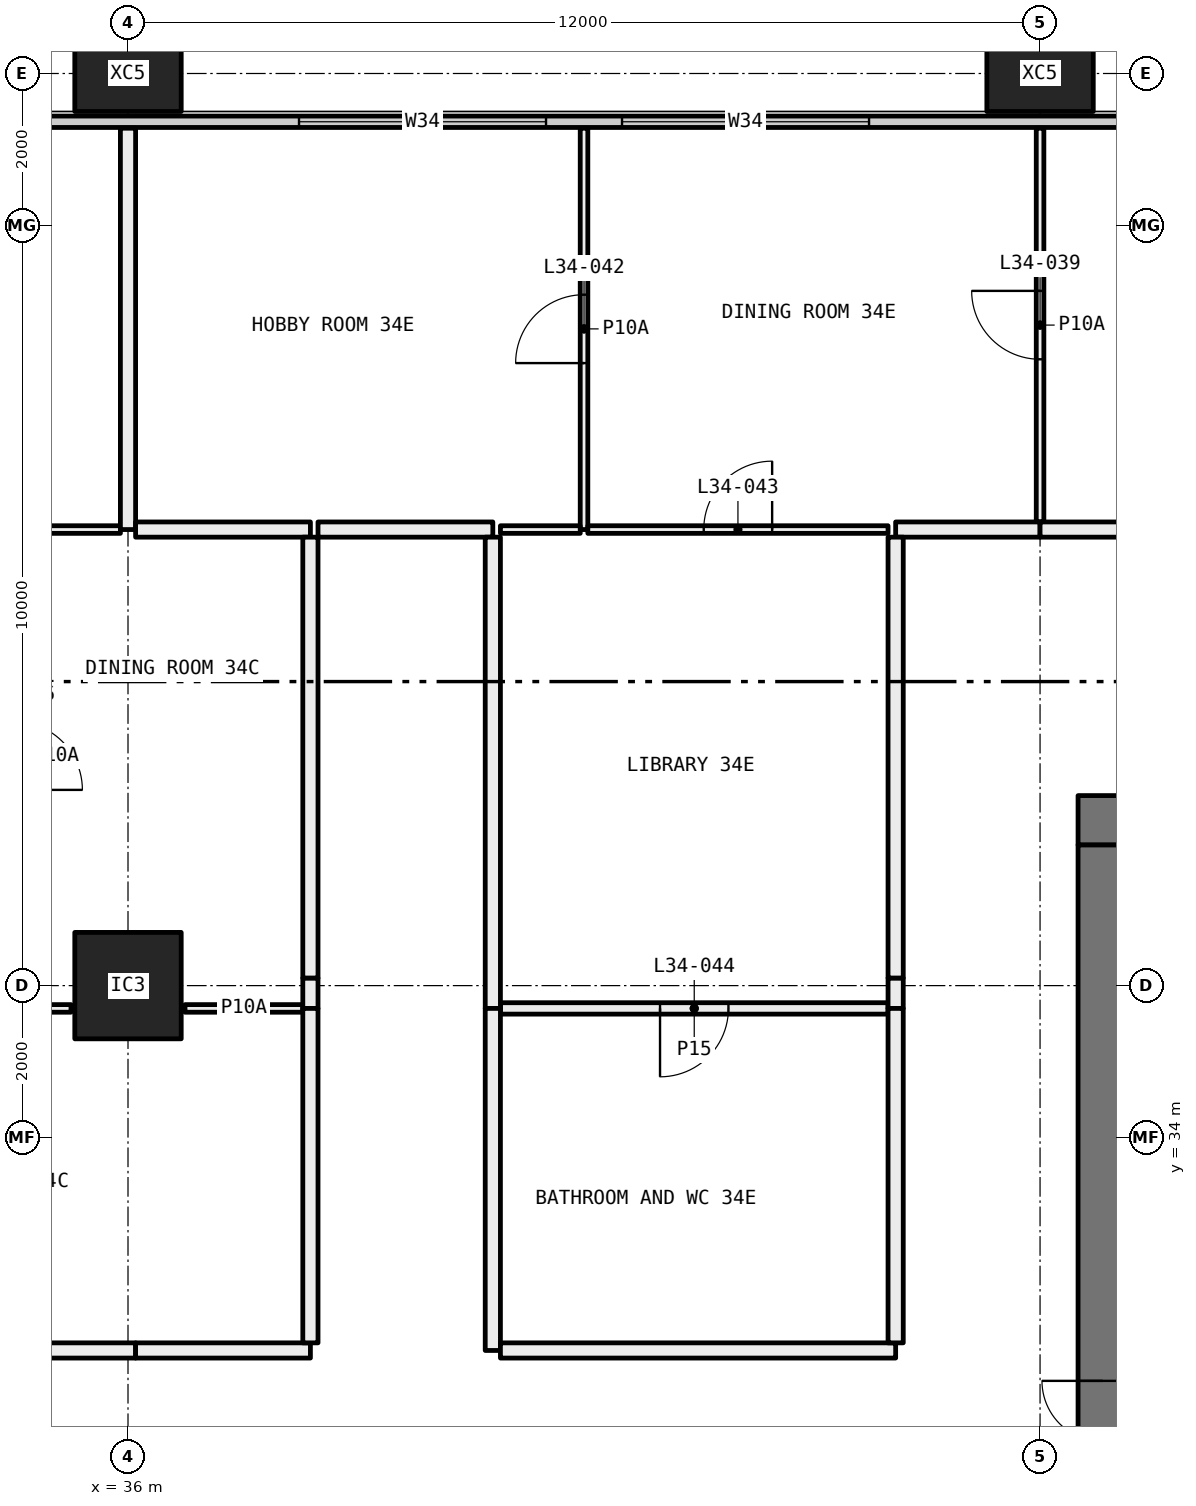
"""IFC4 building model, lengths in metres.
Left out: names, types, materials, properties, quantities, classifications, styles, units other than length and angle.
Written with IfcOpenShell. Run it as: python <this file> out.ifc"""

import sys

from ifc_helpers import new_model, si_unit, direction, frame, frame_2d, origin, origin_2d, place, context, subcontext, project, spatial, rectangle, hollow_rectangle, extrude, element, fill, save


model = new_model("IFC4")
c1 = context("Model", 3, precision=1e-05, world=origin(), true_north=direction((0.0, 1.0)))
c2 = subcontext(c1, "Body", "Model", "MODEL_VIEW")
j1 = project(units=[si_unit("LENGTHUNIT", "METRE"), si_unit("PLANEANGLEUNIT", "RADIAN")], contexts=[c1])
p1 = place(None, origin())
s1 = spatial("IfcSite", under=j1, at=p1, CompositionType="ELEMENT")
p2 = place(p1, origin())
s2 = spatial("IfcBuilding", under=s1, at=p2, CompositionType="ELEMENT")
p3 = place(p2, frame((0.0, 0.0, 131.1)))
s3 = spatial("IfcBuildingStorey", under=s2, at=p3, CompositionType="ELEMENT", Elevation=131.1)
p4 = place(p3, frame((36.0, 36.0, 0.0), z_axis=(0.0, 0.0, 1.0), x_axis=(1.0, 0.0, 0.0)))
e1 = element("IfcColumn", 1, at=p4, inside=s3, PredefinedType="COLUMN", context=c2, shape_type="SweptSolid", body=[
    extrude(hollow_rectangle(XDim=1.4, YDim=1.4, WallThickness=0.06, at=origin_2d()), origin(), (0.0, 0.0, 1.0), 3.05),
])
for number, where, z_axis, x_axis in (
    (2, (36.0, 48.0, -0.4), (0.0, 0.0, 1.0), (1.0, 0.0, 0.0)),
    (3, (48.0, 48.0, -0.4), (0.0, 0.0, 1.0), (1.0, 0.0, 0.0)),
):
    element("IfcColumn", number, at=place(p3, frame(where, z_axis=z_axis, x_axis=x_axis)), inside=s3, PredefinedType="COLUMN", context=c2, shape_type="SweptSolid", body=[
        extrude(hollow_rectangle(XDim=1.4, YDim=1.0, WallThickness=0.055, at=origin_2d()), origin(), (0.0, 0.0, 1.0), 3.45),
    ])
p5 = place(p3, frame((6.56, 47.365, 0.0), z_axis=(0.0, 0.0, 1.0), x_axis=(1.0, 0.0, 0.0)))
e4 = element("IfcWall", 4, at=p5, inside=s3, PredefinedType="ELEMENTEDWALL", context=c2, shape_type="SweptSolid", body=[
    extrude(rectangle(XDim=58.88, YDim=0.15, at=frame_2d((29.44, 0.0))), origin(), (0.0, 0.0, 1.0), 3.05),
])
p6 = place(p5, frame((0.44, 0.0, 0.45)))
e5 = element("IfcOpeningElement", 5, at=p6, cuts=e4, PredefinedType="OPENING", context=c2, shape_type="SweptSolid", body=[
    extrude(rectangle(XDim=4.5, YDim=2.55, at=frame_2d((2.25, 1.275))), frame((0.0, 0.085, 0.0), z_axis=(0.0, -1.0, 0.0), x_axis=(1.0, 0.0, 0.0)), (0.0, 0.0, 1.0), 0.17),
])
p7 = place(p5, frame((7.69, 0.0, 0.45)))
e6 = element("IfcOpeningElement", 6, at=p7, cuts=e4, PredefinedType="OPENING", context=c2, shape_type="SweptSolid", body=[
    extrude(rectangle(XDim=3.25, YDim=2.55, at=frame_2d((1.625, 1.275))), frame((0.0, 0.085, 0.0), z_axis=(0.0, -1.0, 0.0), x_axis=(1.0, 0.0, 0.0)), (0.0, 0.0, 1.0), 0.17),
])
p8 = place(p5, frame((11.94, 0.0, 0.45)))
e7 = element("IfcOpeningElement", 7, at=p8, cuts=e4, PredefinedType="OPENING", context=c2, shape_type="SweptSolid", body=[
    extrude(rectangle(XDim=3.25, YDim=2.55, at=frame_2d((1.625, 1.275))), frame((0.0, 0.085, 0.0), z_axis=(0.0, -1.0, 0.0), x_axis=(1.0, 0.0, 0.0)), (0.0, 0.0, 1.0), 0.17),
])
p9 = place(p5, frame((19.69, 0.0, 0.45)))
e8 = element("IfcOpeningElement", 8, at=p9, cuts=e4, PredefinedType="OPENING", context=c2, shape_type="SweptSolid", body=[
    extrude(rectangle(XDim=3.25, YDim=2.55, at=frame_2d((1.625, 1.275))), frame((0.0, 0.085, 0.0), z_axis=(0.0, -1.0, 0.0), x_axis=(1.0, 0.0, 0.0)), (0.0, 0.0, 1.0), 0.17),
])
p10 = place(p5, frame((23.94, 0.0, 0.45)))
e9 = element("IfcOpeningElement", 9, at=p10, cuts=e4, PredefinedType="OPENING", context=c2, shape_type="SweptSolid", body=[
    extrude(rectangle(XDim=2.0, YDim=2.55, at=frame_2d((1.0, 1.275))), frame((0.0, 0.085, 0.0), z_axis=(0.0, -1.0, 0.0), x_axis=(1.0, 0.0, 0.0)), (0.0, 0.0, 1.0), 0.17),
])
p11 = place(p5, frame((31.69, 0.0, 0.45)))
e10 = element("IfcOpeningElement", 10, at=p11, cuts=e4, PredefinedType="OPENING", context=c2, shape_type="SweptSolid", body=[
    extrude(rectangle(XDim=3.25, YDim=2.55, at=frame_2d((1.625, 1.275))), frame((0.0, 0.085, 0.0), z_axis=(0.0, -1.0, 0.0), x_axis=(1.0, 0.0, 0.0)), (0.0, 0.0, 1.0), 0.17),
])
p12 = place(p5, frame((35.94, 0.0, 0.45)))
e11 = element("IfcOpeningElement", 11, at=p12, cuts=e4, PredefinedType="OPENING", context=c2, shape_type="SweptSolid", body=[
    extrude(rectangle(XDim=3.25, YDim=2.55, at=frame_2d((1.625, 1.275))), frame((0.0, 0.085, 0.0), z_axis=(0.0, -1.0, 0.0), x_axis=(1.0, 0.0, 0.0)), (0.0, 0.0, 1.0), 0.17),
])
p13 = place(p5, frame((43.69, 0.0, 0.45)))
e12 = element("IfcOpeningElement", 12, at=p13, cuts=e4, PredefinedType="OPENING", context=c2, shape_type="SweptSolid", body=[
    extrude(rectangle(XDim=3.25, YDim=2.55, at=frame_2d((1.625, 1.275))), frame((0.0, 0.085, 0.0), z_axis=(0.0, -1.0, 0.0), x_axis=(1.0, 0.0, 0.0)), (0.0, 0.0, 1.0), 0.17),
])
p14 = place(p5, frame((47.94, 0.0, 0.45)))
e13 = element("IfcOpeningElement", 13, at=p14, cuts=e4, PredefinedType="OPENING", context=c2, shape_type="SweptSolid", body=[
    extrude(rectangle(XDim=2.0, YDim=2.55, at=frame_2d((1.0, 1.275))), frame((0.0, 0.085, 0.0), z_axis=(0.0, -1.0, 0.0), x_axis=(1.0, 0.0, 0.0)), (0.0, 0.0, 1.0), 0.17),
])
p15 = place(p5, frame((53.94, 0.0, 0.45)))
e14 = element("IfcOpeningElement", 14, at=p15, cuts=e4, PredefinedType="OPENING", context=c2, shape_type="SweptSolid", body=[
    extrude(rectangle(XDim=4.5, YDim=2.55, at=frame_2d((2.25, 1.275))), frame((0.0, 0.085, 0.0), z_axis=(0.0, -1.0, 0.0), x_axis=(1.0, 0.0, 0.0)), (0.0, 0.0, 1.0), 0.17),
])
p16 = place(p3, frame((34.5, 42.0, 0.0), z_axis=(0.0, 0.0, 1.0), x_axis=(1.0, 0.0, 0.0)))
e15 = element("IfcWall", 15, at=p16, inside=s3, PredefinedType="PARTITIONING", context=c2, shape_type="SweptSolid", body=[
    extrude(rectangle(XDim=1.4, YDim=0.1, at=frame_2d((0.7, 0.0))), origin(), (0.0, 0.0, 1.0), 3.05),
])
p17 = place(p3, frame((36.0, 42.0, 0.0), z_axis=(0.0, 0.0, 1.0), x_axis=(0.0, 1.0, 0.0)))
e16 = element("IfcWall", 16, at=p17, inside=s3, PredefinedType="PARTITIONING", context=c2, shape_type="SweptSolid", body=[
    extrude(rectangle(XDim=5.28, YDim=0.2, at=frame_2d((2.64, 0.0))), origin(), (0.0, 0.0, 1.0), 2.45),
])
p18 = place(p3, frame((34.55, 35.7, 0.0), z_axis=(0.0, 0.0, 1.0), x_axis=(1.0, 0.0, 0.0)))
e17 = element("IfcWall", 17, at=p18, inside=s3, PredefinedType="PARTITIONING", context=c2, shape_type="SweptSolid", body=[
    extrude(rectangle(XDim=0.7, YDim=0.1, at=frame_2d((0.35, 0.0))), origin(), (0.0, 0.0, 1.0), 3.05),
])
p19 = place(p3, frame((36.75, 35.7, 0.0), z_axis=(0.0, 0.0, 1.0), x_axis=(1.0, 0.0, 0.0)))
e18 = element("IfcWall", 18, at=p19, inside=s3, PredefinedType="PARTITIONING", context=c2, shape_type="SweptSolid", body=[
    extrude(rectangle(XDim=1.55, YDim=0.1, at=frame_2d((0.775, 0.0))), origin(), (0.0, 0.0, 1.0), 3.05),
])
p20 = place(p3, frame((38.4, 42.0, 0.0), z_axis=(0.0, 0.0, 1.0), x_axis=(-1.0, 0.0, 0.0)))
e19 = element("IfcWall", 19, at=p20, inside=s3, PredefinedType="PARTITIONING", context=c2, shape_type="SweptSolid", body=[
    extrude(rectangle(XDim=2.3, YDim=0.2, at=frame_2d((1.15, 0.0))), origin(), (0.0, 0.0, 1.0), 3.05),
])
p21 = place(p3, frame((38.4, 35.7, 0.0), z_axis=(0.0, 0.0, 1.0), x_axis=(0.0, 1.0, 0.0)))
e20 = element("IfcWall", 20, at=p21, inside=s3, PredefinedType="PARTITIONING", context=c2, shape_type="SweptSolid", body=[
    extrude(rectangle(XDim=0.4, YDim=0.2, at=frame_2d((0.2, 0.0))), origin(), (0.0, 0.0, 1.0), 2.45),
])
p22 = place(p3, frame((38.4, 36.1, 0.0), z_axis=(0.0, 0.0, 1.0), x_axis=(0.0, 1.0, 0.0)))
e21 = element("IfcWall", 21, at=p22, inside=s3, PredefinedType="PARTITIONING", context=c2, shape_type="SweptSolid", body=[
    extrude(rectangle(XDim=5.8, YDim=0.2, at=frame_2d((2.9, 0.0))), origin(), (0.0, 0.0, 1.0), 3.05),
])
p23 = place(p3, frame((28.5, 31.2, 0.0), z_axis=(0.0, 0.0, 1.0), x_axis=(1.0, 0.0, 0.0)))
e22 = element("IfcWall", 22, at=p23, inside=s3, PredefinedType="PARTITIONING", context=c2, shape_type="SweptSolid", body=[
    extrude(rectangle(XDim=7.6, YDim=0.2, at=frame_2d((3.8, 0.0))), origin(), (0.0, 0.0, 1.0), 2.45),
])
p24 = place(p3, frame((36.1, 31.2, 0.0), z_axis=(0.0, 0.0, 1.0), x_axis=(1.0, 0.0, 0.0)))
e23 = element("IfcWall", 23, at=p24, inside=s3, PredefinedType="PARTITIONING", context=c2, shape_type="SweptSolid", body=[
    extrude(rectangle(XDim=2.3, YDim=0.2, at=frame_2d((1.15, 0.0))), origin(), (0.0, 0.0, 1.0), 3.05),
])
p25 = place(p3, frame((38.4, 31.3, 0.0), z_axis=(0.0, 0.0, 1.0), x_axis=(0.0, 1.0, 0.0)))
e24 = element("IfcWall", 24, at=p25, inside=s3, PredefinedType="PARTITIONING", context=c2, shape_type="SweptSolid", body=[
    extrude(rectangle(XDim=4.4, YDim=0.2, at=frame_2d((2.2, 0.0))), origin(), (0.0, 0.0, 1.0), 3.05),
])
p26 = place(p3, frame((42.0, 42.0, 0.0), z_axis=(0.0, 0.0, 1.0), x_axis=(0.0, 1.0, 0.0)))
e25 = element("IfcWall", 25, at=p26, inside=s3, PredefinedType="PARTITIONING", context=c2, shape_type="SweptSolid", body=[
    extrude(rectangle(XDim=5.28, YDim=0.1, at=frame_2d((2.64, 0.0))), origin(), (0.0, 0.0, 1.0), 3.05),
])
p27 = place(p26, frame((2.19, 0.0, 0.0)))
e26 = element("IfcOpeningElement", 26, at=p27, cuts=e25, PredefinedType="OPENING", context=c2, shape_type="SweptSolid", body=[
    extrude(rectangle(XDim=0.9, YDim=2.1, at=frame_2d((0.45, 1.05))), frame((0.0, 0.06, 0.0), z_axis=(0.0, -1.0, 0.0), x_axis=(1.0, 0.0, 0.0)), (0.0, 0.0, 1.0), 0.12),
])
p28 = place(p3, frame((40.9, 42.0, 0.0), z_axis=(0.0, 0.0, 1.0), x_axis=(1.0, 0.0, 0.0)))
e27 = element("IfcWall", 27, at=p28, inside=s3, PredefinedType="PARTITIONING", context=c2, shape_type="SweptSolid", body=[
    extrude(rectangle(XDim=1.05, YDim=0.1, at=frame_2d((0.525, 0.0))), origin(), (0.0, 0.0, 1.0), 3.05),
])
p29 = place(p3, frame((38.5, 42.0, 0.0), z_axis=(0.0, 0.0, 1.0), x_axis=(1.0, 0.0, 0.0)))
e28 = element("IfcWall", 28, at=p29, inside=s3, PredefinedType="PARTITIONING", context=c2, shape_type="SweptSolid", body=[
    extrude(rectangle(XDim=2.3, YDim=0.2, at=frame_2d((1.15, 0.0))), origin(), (0.0, 0.0, 1.0), 3.05),
])
p30 = place(p3, frame((48.0, 42.1, 0.0), z_axis=(0.0, 0.0, 1.0), x_axis=(0.0, 1.0, 0.0)))
e29 = element("IfcWall", 29, at=p30, inside=s3, PredefinedType="PARTITIONING", context=c2, shape_type="SweptSolid", body=[
    extrude(rectangle(XDim=5.18, YDim=0.1, at=frame_2d((2.59, 0.0))), origin(), (0.0, 0.0, 1.0), 3.05),
])
p31 = place(p30, frame((2.14, 0.0, 0.0)))
e30 = element("IfcOpeningElement", 30, at=p31, cuts=e29, PredefinedType="OPENING", context=c2, shape_type="SweptSolid", body=[
    extrude(rectangle(XDim=0.9, YDim=2.1, at=frame_2d((0.45, 1.05))), frame((0.0, 0.06, 0.0), z_axis=(0.0, -1.0, 0.0), x_axis=(1.0, 0.0, 0.0)), (0.0, 0.0, 1.0), 0.12),
])
p32 = place(p3, frame((42.05, 42.0, 0.0), z_axis=(0.0, 0.0, 1.0), x_axis=(1.0, 0.0, 0.0)))
e31 = element("IfcWall", 31, at=p32, inside=s3, PredefinedType="PARTITIONING", context=c2, shape_type="SweptSolid", body=[
    extrude(rectangle(XDim=3.95, YDim=0.1, at=frame_2d((1.975, 0.0))), origin(), (0.0, 0.0, 1.0), 3.05),
])
p33 = place(p32, frame((1.525, 0.0, 0.0)))
e32 = element("IfcOpeningElement", 32, at=p33, cuts=e31, PredefinedType="OPENING", context=c2, shape_type="SweptSolid", body=[
    extrude(rectangle(XDim=0.9, YDim=2.1, at=frame_2d((0.45, 1.05))), frame((0.0, 0.06, 0.0), z_axis=(0.0, -1.0, 0.0), x_axis=(1.0, 0.0, 0.0)), (0.0, 0.0, 1.0), 0.12),
])
p34 = place(p3, frame((46.1, 42.0, 0.0), z_axis=(0.0, 0.0, 1.0), x_axis=(1.0, 0.0, 0.0)))
e33 = element("IfcWall", 33, at=p34, inside=s3, PredefinedType="PARTITIONING", context=c2, shape_type="SweptSolid", body=[
    extrude(rectangle(XDim=1.9, YDim=0.2, at=frame_2d((0.95, 0.0))), origin(), (0.0, 0.0, 1.0), 3.05),
])
p35 = place(p3, frame((48.0, 42.0, 0.0), z_axis=(0.0, 0.0, 1.0), x_axis=(1.0, 0.0, 0.0)))
e34 = element("IfcWall", 34, at=p35, inside=s3, PredefinedType="PARTITIONING", context=c2, shape_type="SweptSolid", body=[
    extrude(rectangle(XDim=6.0, YDim=0.2, at=frame_2d((3.0, 0.0))), origin(), (0.0, 0.0, 1.0), 3.05),
])
p36 = place(p35, frame((2.5, 0.0, 0.0)))
e35 = element("IfcOpeningElement", 35, at=p36, cuts=e34, PredefinedType="OPENING", context=c2, shape_type="SweptSolid", body=[
    extrude(rectangle(XDim=1.0, YDim=2.1, at=frame_2d((0.5, 1.05))), frame((0.0, 0.11, 0.0), z_axis=(0.0, -1.0, 0.0), x_axis=(1.0, 0.0, 0.0)), (0.0, 0.0, 1.0), 0.22),
])
p37 = place(p3, frame((40.9, 35.7, 0.0), z_axis=(0.0, 0.0, 1.0), x_axis=(1.0, 0.0, 0.0)))
e36 = element("IfcWall", 36, at=p37, inside=s3, PredefinedType="PARTITIONING", context=c2, shape_type="SweptSolid", body=[
    extrude(rectangle(XDim=5.1, YDim=0.15, at=frame_2d((2.55, 0.0))), origin(), (0.0, 0.0, 1.0), 3.05),
])
p38 = place(p37, frame((2.1, 0.0, 0.0)))
e37 = element("IfcOpeningElement", 37, at=p38, cuts=e36, PredefinedType="OPENING", context=c2, shape_type="SweptSolid", body=[
    extrude(rectangle(XDim=0.9, YDim=2.1, at=frame_2d((0.45, 1.05))), frame((0.0, 0.085, 0.0), z_axis=(0.0, -1.0, 0.0), x_axis=(1.0, 0.0, 0.0)), (0.0, 0.0, 1.0), 0.17),
])
p39 = place(p3, frame((40.8, 41.9, 0.0), z_axis=(0.0, 0.0, 1.0), x_axis=(0.0, -1.0, 0.0)))
e38 = element("IfcWall", 38, at=p39, inside=s3, PredefinedType="PARTITIONING", context=c2, shape_type="SweptSolid", body=[
    extrude(rectangle(XDim=6.2, YDim=0.2, at=frame_2d((3.1, 0.0))), origin(), (0.0, 0.0, 1.0), 2.45),
])
p40 = place(p3, frame((46.1, 35.7, 0.0), z_axis=(0.0, 0.0, 1.0), x_axis=(0.0, 1.0, 0.0)))
e39 = element("IfcWall", 39, at=p40, inside=s3, PredefinedType="PARTITIONING", context=c2, shape_type="SweptSolid", body=[
    extrude(rectangle(XDim=0.4, YDim=0.2, at=frame_2d((0.2, 0.0))), origin(), (0.0, 0.0, 1.0), 2.45),
])
p41 = place(p3, frame((46.1, 36.1, 0.0), z_axis=(0.0, 0.0, 1.0), x_axis=(0.0, 1.0, 0.0)))
e40 = element("IfcWall", 40, at=p41, inside=s3, PredefinedType="PARTITIONING", context=c2, shape_type="SweptSolid", body=[
    extrude(rectangle(XDim=5.8, YDim=0.2, at=frame_2d((2.9, 0.0))), origin(), (0.0, 0.0, 1.0), 3.05),
])
p42 = place(p3, frame((40.8, 35.7, 0.0), z_axis=(0.0, 0.0, 1.0), x_axis=(0.0, -1.0, 0.0)))
e41 = element("IfcWall", 41, at=p42, inside=s3, PredefinedType="PARTITIONING", context=c2, shape_type="SweptSolid", body=[
    extrude(rectangle(XDim=4.5, YDim=0.2, at=frame_2d((2.25, 0.0))), origin(), (0.0, 0.0, 1.0), 3.05),
])
p43 = place(p3, frame((40.9, 31.2, 0.0), z_axis=(0.0, 0.0, 1.0), x_axis=(1.0, 0.0, 0.0)))
e42 = element("IfcWall", 42, at=p43, inside=s3, PredefinedType="PARTITIONING", context=c2, shape_type="SweptSolid", body=[
    extrude(rectangle(XDim=5.2, YDim=0.2, at=frame_2d((2.6, 0.0))), origin(), (0.0, 0.0, 1.0), 3.05),
])
p44 = place(p3, frame((46.1, 31.3, 0.0), z_axis=(0.0, 0.0, 1.0), x_axis=(0.0, 1.0, 0.0)))
e43 = element("IfcWall", 43, at=p44, inside=s3, PredefinedType="PARTITIONING", context=c2, shape_type="SweptSolid", body=[
    extrude(rectangle(XDim=4.4, YDim=0.2, at=frame_2d((2.2, 0.0))), origin(), (0.0, 0.0, 1.0), 3.05),
])
p45 = place(p3, frame((59.5, 38.175, 0.0), z_axis=(0.0, 0.0, 1.0), x_axis=(-1.0, 0.0, 0.0)))
e44 = element("IfcWall", 44, at=p45, inside=s3, PredefinedType="SHEAR", context=c2, shape_type="SweptSolid", body=[
    extrude(rectangle(XDim=11.0, YDim=0.65, at=frame_2d((5.5, 0.0))), origin(), (0.0, 0.0, 1.0), 3.05),
])
p46 = place(p45, frame((8.475, 0.0, 0.0)))
e45 = element("IfcOpeningElement", 45, at=p46, cuts=e44, PredefinedType="OPENING", context=c2, shape_type="SweptSolid", body=[
    extrude(rectangle(XDim=1.6, YDim=2.1, at=frame_2d((0.8, 1.05))), frame((0.0, 0.335, 0.0), z_axis=(0.0, -1.0, 0.0), x_axis=(1.0, 0.0, 0.0)), (0.0, 0.0, 1.0), 0.67),
])
p47 = place(p3, frame((48.825, 22.15, 0.0), z_axis=(0.0, 0.0, 1.0), x_axis=(0.0, 1.0, 0.0)))
e46 = element("IfcWall", 46, at=p47, inside=s3, PredefinedType="SHEAR", context=c2, shape_type="SweptSolid", body=[
    extrude(rectangle(XDim=15.7, YDim=0.65, at=frame_2d((7.85, 0.0))), origin(), (0.0, 0.0, 1.0), 3.05),
])
p48 = place(p47, frame((7.05, 0.0, 0.0)))
e47 = element("IfcOpeningElement", 47, at=p48, cuts=e46, PredefinedType="OPENING", context=c2, shape_type="SweptSolid", body=[
    extrude(rectangle(XDim=1.6, YDim=2.1, at=frame_2d((0.8, 1.05))), frame((0.0, 0.335, 0.0), z_axis=(0.0, -1.0, 0.0), x_axis=(1.0, 0.0, 0.0)), (0.0, 0.0, 1.0), 0.67),
])
p49 = place(p11, origin())
e48 = element("IfcWindow", 48, at=p49, inside=s3, PartitioningType="SINGLE_PANEL", PredefinedType="WINDOW", context=c2, shape_type="SweptSolid", body=[
    extrude(rectangle(XDim=3.25, YDim=2.55, at=frame_2d((1.625, 1.275))), frame((0.0, 0.03, 0.0), z_axis=(0.0, -1.0, 0.0), x_axis=(1.0, 0.0, 0.0)), (0.0, 0.0, 1.0), 0.06),
])
fill(e10, e48)
p50 = place(p12, origin())
e49 = element("IfcWindow", 49, at=p50, inside=s3, PartitioningType="SINGLE_PANEL", PredefinedType="WINDOW", context=c2, shape_type="SweptSolid", body=[
    extrude(rectangle(XDim=3.25, YDim=2.55, at=frame_2d((1.625, 1.275))), frame((0.0, 0.03, 0.0), z_axis=(0.0, -1.0, 0.0), x_axis=(1.0, 0.0, 0.0)), (0.0, 0.0, 1.0), 0.06),
])
fill(e11, e49)
p51 = place(p31, origin())
e50 = element("IfcDoor", 50, at=p51, inside=s3, OperationType="SINGLE_SWING_LEFT", PredefinedType="DOOR", context=c2, shape_type="SweptSolid", body=[
    extrude(rectangle(XDim=0.9, YDim=2.1, at=frame_2d((0.45, 1.05))), frame((0.0, 0.025, 0.0), z_axis=(0.0, -1.0, 0.0), x_axis=(1.0, 0.0, 0.0)), (0.0, 0.0, 1.0), 0.05),
])
fill(e30, e50)
p52 = place(p27, origin())
e51 = element("IfcDoor", 51, at=p52, inside=s3, OperationType="SINGLE_SWING_RIGHT", PredefinedType="DOOR", context=c2, shape_type="SweptSolid", body=[
    extrude(rectangle(XDim=0.9, YDim=2.1, at=frame_2d((0.45, 1.05))), frame((0.0, 0.025, 0.0), z_axis=(0.0, -1.0, 0.0), x_axis=(1.0, 0.0, 0.0)), (0.0, 0.0, 1.0), 0.05),
])
fill(e26, e51)
p53 = place(p33, origin())
e52 = element("IfcDoor", 52, at=p53, inside=s3, OperationType="SINGLE_SWING_LEFT", PredefinedType="DOOR", context=c2, shape_type="SweptSolid", body=[
    extrude(rectangle(XDim=0.9, YDim=2.1, at=frame_2d((0.45, 1.05))), frame((0.0, 0.025, 0.0), z_axis=(0.0, -1.0, 0.0), x_axis=(1.0, 0.0, 0.0)), (0.0, 0.0, 1.0), 0.05),
])
fill(e32, e52)
p54 = place(p38, frame((0.9, 0.0, 0.0), x_axis=(-1.0, 0.0, 0.0)))
e53 = element("IfcDoor", 53, at=p54, inside=s3, OperationType="SINGLE_SWING_LEFT", PredefinedType="DOOR", context=c2, shape_type="SweptSolid", body=[
    extrude(rectangle(XDim=0.9, YDim=2.1, at=frame_2d((0.45, 1.05))), frame((0.0, 0.025, 0.0), z_axis=(0.0, -1.0, 0.0), x_axis=(1.0, 0.0, 0.0)), (0.0, 0.0, 1.0), 0.05),
])
fill(e37, e53)
p55 = place(p48, origin())
e54 = element("IfcDoor", 54, at=p55, inside=s3, OperationType="DOUBLE_DOOR_SINGLE_SWING", PredefinedType="DOOR", context=c2, shape_type="SweptSolid", body=[
    extrude(rectangle(XDim=1.6, YDim=2.1, at=frame_2d((0.8, 1.05))), frame((0.0, 0.025, 0.0), z_axis=(0.0, -1.0, 0.0), x_axis=(1.0, 0.0, 0.0)), (0.0, 0.0, 1.0), 0.05),
])
fill(e47, e54)
save(model, sys.argv[1])
